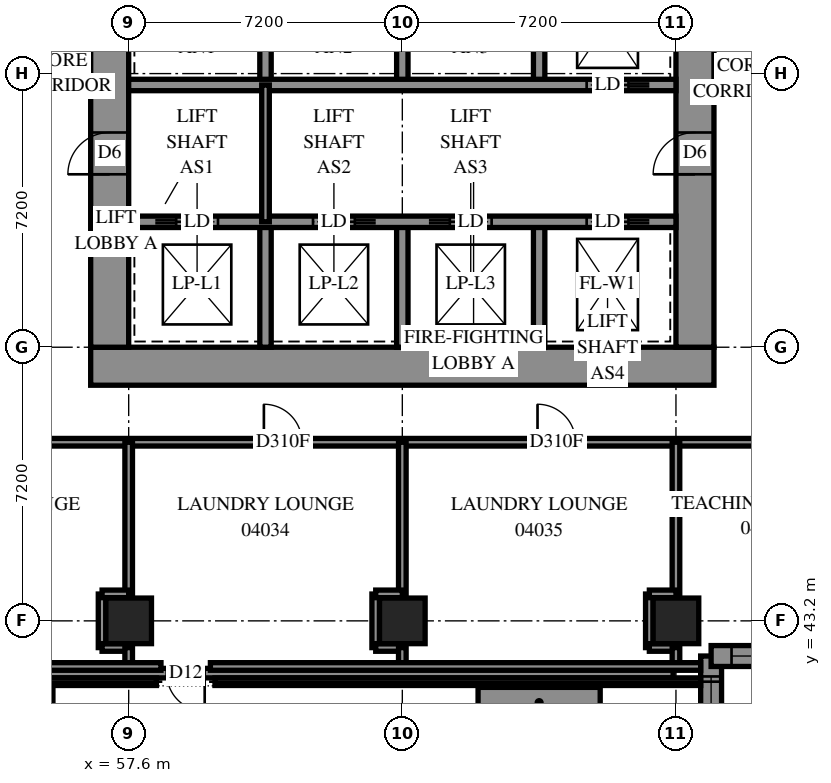
"""IFC4 building model, lengths in metres.
Left out: names, types, materials, properties, quantities, classifications, styles, units other than length and angle.
Written with IfcOpenShell. Run it as: python <this file> out.ifc"""

import sys

from ifc_helpers import new_model, si_unit, direction, frame, frame_2d, origin, origin_2d, place, context, subcontext, project, spatial, polyline, rectangle, outline, extrude, element, fill, save


model = new_model("IFC4")
c1 = context("Model", 3, precision=1e-05, world=origin(), true_north=direction((0.0, 1.0)))
c2 = subcontext(c1, "Body", "Model", "MODEL_VIEW")
j1 = project(units=[si_unit("LENGTHUNIT", "METRE"), si_unit("PLANEANGLEUNIT", "RADIAN")], contexts=[c1])
p1 = place(None, origin())
s1 = spatial("IfcSite", under=j1, at=p1, CompositionType="ELEMENT")
p2 = place(p1, origin())
s2 = spatial("IfcBuilding", under=s1, at=p2, CompositionType="ELEMENT")
p3 = place(p2, frame((0.0, 0.0, 18.6)))
s3 = spatial("IfcBuildingStorey", under=s2, at=p3, CompositionType="ELEMENT", Elevation=18.6)
for number, where, z_axis, x_axis in (
    (1, (57.6, 43.2, 0.0), (0.0, 0.0, 1.0), (1.0, 0.0, 0.0)),
    (2, (64.8, 43.2, 0.0), (0.0, 0.0, 1.0), (1.0, 0.0, 0.0)),
    (3, (72.0, 43.2, 0.0), (0.0, 0.0, 1.0), (1.0, 0.0, 0.0)),
):
    element("IfcColumn", number, at=place(p3, frame(where, z_axis=z_axis, x_axis=x_axis)), inside=s3, PredefinedType="COLUMN", context=c2, shape_type="SweptSolid", body=[
        extrude(rectangle(XDim=1.2, YDim=1.2, at=origin_2d()), origin(), (0.0, 0.0, 1.0), 3.8),
    ])
p4 = place(p3, frame((56.6, 49.9, -0.4), z_axis=(0.0, 0.0, 1.0), x_axis=(1.0, 0.0, 0.0)))
e4 = element("IfcWall", 4, at=p4, inside=s3, PredefinedType="SHEAR", context=c2, shape_type="SweptSolid", body=[
    extrude(rectangle(XDim=16.4, YDim=1.0, at=frame_2d((8.2, 0.0))), origin(), (0.0, 0.0, 1.0), 3.5),
])
p5 = place(p3, frame((57.1, 50.4, -0.4), z_axis=(0.0, 0.0, 1.0), x_axis=(0.0, 1.0, 0.0)))
e5 = element("IfcWall", 5, at=p5, inside=s3, PredefinedType="SHEAR", context=c2, shape_type="SweptSolid", body=[
    extrude(rectangle(XDim=14.4, YDim=1.0, at=frame_2d((7.2, 0.0))), origin(), (0.0, 0.0, 1.0), 3.5),
])
p6 = place(p5, frame((4.55, 0.0, 0.4)))
e6 = element("IfcOpeningElement", 6, at=p6, cuts=e5, PredefinedType="OPENING", context=c2, shape_type="SweptSolid", body=[
    extrude(rectangle(XDim=1.1, YDim=2.1, at=frame_2d((0.55, 1.05))), frame((0.0, 0.51, 0.0), z_axis=(0.0, -1.0, 0.0), x_axis=(1.0, 0.0, 0.0)), (0.0, 0.0, 1.0), 1.02),
])
p7 = place(p5, frame((11.35, 0.0, 0.4)))
e7 = element("IfcOpeningElement", 7, at=p7, cuts=e5, PredefinedType="OPENING", context=c2, shape_type="SweptSolid", body=[
    extrude(rectangle(XDim=1.1, YDim=2.1, at=frame_2d((0.55, 1.05))), frame((0.0, 0.51, 0.0), z_axis=(0.0, -1.0, 0.0), x_axis=(1.0, 0.0, 0.0)), (0.0, 0.0, 1.0), 1.02),
])
p8 = place(p3, frame((72.5, 50.4, -0.4), z_axis=(0.0, 0.0, 1.0), x_axis=(0.0, 1.0, 0.0)))
e8 = element("IfcWall", 8, at=p8, inside=s3, PredefinedType="SHEAR", context=c2, shape_type="SweptSolid", body=[
    extrude(rectangle(XDim=14.4, YDim=1.0, at=frame_2d((7.2, 0.0))), origin(), (0.0, 0.0, 1.0), 3.5),
])
p9 = place(p8, frame((4.55, 0.0, 0.4)))
e9 = element("IfcOpeningElement", 9, at=p9, cuts=e8, PredefinedType="OPENING", context=c2, shape_type="SweptSolid", body=[
    extrude(rectangle(XDim=1.1, YDim=2.1, at=frame_2d((0.55, 1.05))), frame((0.0, 0.51, 0.0), z_axis=(0.0, -1.0, 0.0), x_axis=(1.0, 0.0, 0.0)), (0.0, 0.0, 1.0), 1.02),
])
p10 = place(p8, frame((11.35, 0.0, 0.4)))
e10 = element("IfcOpeningElement", 10, at=p10, cuts=e8, PredefinedType="OPENING", context=c2, shape_type="SweptSolid", body=[
    extrude(rectangle(XDim=1.1, YDim=2.1, at=frame_2d((0.55, 1.05))), frame((0.0, 0.51, 0.0), z_axis=(0.0, -1.0, 0.0), x_axis=(1.0, 0.0, 0.0)), (0.0, 0.0, 1.0), 1.02),
])
for number, where, z_axis, x_axis in (
    (11, (61.2, 50.4, 0.0), (0.0, 0.0, 1.0), (0.0, 1.0, 0.0)),
    (12, (61.2, 57.3, 0.0), (0.0, 0.0, 1.0), (0.0, 1.0, 0.0)),
    (13, (64.8, 50.4, 0.0), (0.0, 0.0, 1.0), (0.0, 1.0, 0.0)),
    (14, (64.8, 57.3, 0.0), (0.0, 0.0, 1.0), (0.0, 1.0, 0.0)),
    (15, (68.4, 50.4, 0.0), (0.0, 0.0, 1.0), (0.0, 1.0, 0.0)),
    (16, (68.4, 57.3, 0.0), (0.0, 0.0, 1.0), (0.0, 1.0, 0.0)),
):
    element("IfcWall", number, at=place(p3, frame(where, z_axis=z_axis, x_axis=x_axis)), inside=s3, PredefinedType="SOLIDWALL", context=c2, shape_type="SweptSolid", body=[
        extrude(rectangle(XDim=3.3, YDim=0.3, at=frame_2d((1.65, 0.0))), origin(), (0.0, 0.0, 1.0), 3.8),
    ])
p11 = place(p3, frame((57.6, 53.7, 0.0), z_axis=(0.0, 0.0, 1.0), x_axis=(1.0, 0.0, 0.0)))
e17 = element("IfcWall", 17, at=p11, inside=s3, PredefinedType="SOLIDWALL", context=c2, shape_type="SweptSolid", body=[
    extrude(rectangle(XDim=14.4, YDim=0.3, at=frame_2d((7.2, 0.0))), origin(), (0.0, 0.0, 1.0), 3.8),
])
p12 = place(p11, frame((1.25, 0.0, 0.0)))
e18 = element("IfcOpeningElement", 18, at=p12, cuts=e17, PredefinedType="OPENING", context=c2, shape_type="SweptSolid", body=[
    extrude(rectangle(XDim=1.1, YDim=2.1, at=frame_2d((0.55, 1.05))), frame((0.0, 0.16, 0.0), z_axis=(0.0, -1.0, 0.0), x_axis=(1.0, 0.0, 0.0)), (0.0, 0.0, 1.0), 0.32),
])
p13 = place(p11, frame((4.85, 0.0, 0.0)))
e19 = element("IfcOpeningElement", 19, at=p13, cuts=e17, PredefinedType="OPENING", context=c2, shape_type="SweptSolid", body=[
    extrude(rectangle(XDim=1.1, YDim=2.1, at=frame_2d((0.55, 1.05))), frame((0.0, 0.16, 0.0), z_axis=(0.0, -1.0, 0.0), x_axis=(1.0, 0.0, 0.0)), (0.0, 0.0, 1.0), 0.32),
])
p14 = place(p11, frame((8.45, 0.0, 0.0)))
e20 = element("IfcOpeningElement", 20, at=p14, cuts=e17, PredefinedType="OPENING", context=c2, shape_type="SweptSolid", body=[
    extrude(rectangle(XDim=1.1, YDim=2.1, at=frame_2d((0.55, 1.05))), frame((0.0, 0.16, 0.0), z_axis=(0.0, -1.0, 0.0), x_axis=(1.0, 0.0, 0.0)), (0.0, 0.0, 1.0), 0.32),
])
p15 = place(p11, frame((12.05, 0.0, 0.0)))
e21 = element("IfcOpeningElement", 21, at=p15, cuts=e17, PredefinedType="OPENING", context=c2, shape_type="SweptSolid", body=[
    extrude(rectangle(XDim=1.1, YDim=2.1, at=frame_2d((0.55, 1.05))), frame((0.0, 0.16, 0.0), z_axis=(0.0, -1.0, 0.0), x_axis=(1.0, 0.0, 0.0)), (0.0, 0.0, 1.0), 0.32),
])
p16 = place(p3, frame((57.6, 57.3, 0.0), z_axis=(0.0, 0.0, 1.0), x_axis=(1.0, 0.0, 0.0)))
e22 = element("IfcWall", 22, at=p16, inside=s3, PredefinedType="SOLIDWALL", context=c2, shape_type="SweptSolid", body=[
    extrude(rectangle(XDim=14.4, YDim=0.3, at=frame_2d((7.2, 0.0))), origin(), (0.0, 0.0, 1.0), 3.8),
])
p17 = place(p16, frame((12.05, 0.0, 0.0)))
e23 = element("IfcOpeningElement", 23, at=p17, cuts=e22, PredefinedType="OPENING", context=c2, shape_type="SweptSolid", body=[
    extrude(rectangle(XDim=1.1, YDim=2.1, at=frame_2d((0.55, 1.05))), frame((0.0, 0.16, 0.0), z_axis=(0.0, -1.0, 0.0), x_axis=(1.0, 0.0, 0.0)), (0.0, 0.0, 1.0), 0.32),
])
p18 = place(p3, frame((72.925, 35.075, 0.0), z_axis=(0.0, 0.0, 1.0), x_axis=(0.0, 1.0, 0.0)))
e24 = element("IfcWall", 24, at=p18, inside=s3, PredefinedType="SOLIDWALL", context=c2, shape_type="SweptSolid", body=[
    extrude(outline(polyline([(-0.275, -0.275), (6.925, -0.275), (7.475, 0.275), (0.275, 0.275), (-0.275, -0.275)])), origin(), (0.0, 0.0, 1.0), 3.8),
])
p19 = place(p18, frame((1.825, 0.0, 0.7)))
e25 = element("IfcOpeningElement", 25, at=p19, cuts=e24, PredefinedType="OPENING", context=c2, shape_type="SweptSolid", body=[
    extrude(rectangle(XDim=1.8, YDim=2.4, at=frame_2d((0.9, 1.2))), frame((0.0, 0.285, 0.0), z_axis=(0.0, -1.0, 0.0), x_axis=(1.0, 0.0, 0.0)), (0.0, 0.0, 1.0), 0.57),
])
p20 = place(p18, frame((4.862, 0.0, 0.7)))
e26 = element("IfcOpeningElement", 26, at=p20, cuts=e24, PredefinedType="OPENING", context=c2, shape_type="SweptSolid", body=[
    extrude(rectangle(XDim=1.8, YDim=2.4, at=frame_2d((0.9, 1.2))), frame((0.0, 0.285, 0.0), z_axis=(0.0, -1.0, 0.0), x_axis=(1.0, 0.0, 0.0)), (0.0, 0.0, 1.0), 0.57),
])
p21 = place(p3, frame((72.925, 42.275, 0.0), z_axis=(0.0, 0.0, 1.0), x_axis=(1.0, 0.0, 0.0)))
e27 = element("IfcWall", 27, at=p21, inside=s3, PredefinedType="SOLIDWALL", context=c2, shape_type="SweptSolid", body=[
    extrude(outline(polyline([(0.275, -0.275), (4.031, -0.275), (4.259, 0.275), (-0.275, 0.275), (0.275, -0.275)])), origin(), (0.0, 0.0, 1.0), 3.8),
])
p22 = place(p21, frame((0.537, 0.0, 0.7)))
e28 = element("IfcOpeningElement", 28, at=p22, cuts=e27, PredefinedType="OPENING", context=c2, shape_type="SweptSolid", body=[
    extrude(rectangle(XDim=1.8, YDim=2.4, at=frame_2d((0.9, 1.2))), frame((0.0, 0.285, 0.0), z_axis=(0.0, -1.0, 0.0), x_axis=(1.0, 0.0, 0.0)), (0.0, 0.0, 1.0), 0.57),
])
p23 = place(p3, frame((61.2, 53.7, 0.0), z_axis=(0.0, 0.0, 1.0), x_axis=(0.0, 1.0, 0.0)))
e29 = element("IfcWall", 29, at=p23, inside=s3, PredefinedType="PARTITIONING", context=c2, shape_type="SweptSolid", body=[
    extrude(rectangle(XDim=3.6, YDim=0.2, at=frame_2d((1.8, 0.0))), origin(), (0.0, 0.0, 1.0), 3.8),
])
p24 = place(p3, frame((55.1, 47.9, 0.0), z_axis=(0.0, 0.0, 1.0), x_axis=(1.0, 0.0, 0.0)))
e30 = element("IfcWall", 30, at=p24, inside=s3, PredefinedType="PARTITIONING", context=c2, shape_type="SweptSolid", body=[
    extrude(rectangle(XDim=19.208, YDim=0.2, at=frame_2d((9.604, 0.0))), origin(), (0.0, 0.0, 1.0), 3.8),
])
p25 = place(p24, frame((6.058, 0.0, 0.0)))
e31 = element("IfcOpeningElement", 31, at=p25, cuts=e30, PredefinedType="OPENING", context=c2, shape_type="SweptSolid", body=[
    extrude(rectangle(XDim=1.0, YDim=2.1, at=frame_2d((0.5, 1.05))), frame((0.0, 0.11, 0.0), z_axis=(0.0, -1.0, 0.0), x_axis=(1.0, 0.0, 0.0)), (0.0, 0.0, 1.0), 0.22),
])
p26 = place(p24, frame((13.258, 0.0, 0.0)))
e32 = element("IfcOpeningElement", 32, at=p26, cuts=e30, PredefinedType="OPENING", context=c2, shape_type="SweptSolid", body=[
    extrude(rectangle(XDim=1.0, YDim=2.1, at=frame_2d((0.5, 1.05))), frame((0.0, 0.11, 0.0), z_axis=(0.0, -1.0, 0.0), x_axis=(1.0, 0.0, 0.0)), (0.0, 0.0, 1.0), 0.22),
])
for number, where, z_axis, x_axis in (
    (33, (57.6, 43.906, 0.0), (0.0, 0.0, 1.0), (0.0, 1.0, 0.0)),
    (34, (64.8, 43.906, 0.0), (0.0, 0.0, 1.0), (0.0, 1.0, 0.0)),
    (35, (72.0, 43.906, 0.0), (0.0, 0.0, 1.0), (0.0, 1.0, 0.0)),
):
    element("IfcWall", number, at=place(p3, frame(where, z_axis=z_axis, x_axis=x_axis)), inside=s3, PredefinedType="PARTITIONING", context=c2, shape_type="SweptSolid", body=[
        extrude(rectangle(XDim=3.994, YDim=0.2, at=frame_2d((1.997, 0.0))), origin(), (0.0, 0.0, 1.0), 3.8),
    ])
for number, where, z_axis, x_axis in (
    (36, (56.9, 42.496, 0.0), (0.0, 0.0, 1.0), (0.0, 1.0, 0.0)),
    (37, (64.1, 42.496, 0.0), (0.0, 0.0, 1.0), (0.0, 1.0, 0.0)),
    (38, (71.3, 42.496, 0.0), (0.0, 0.0, 1.0), (0.0, 1.0, 0.0)),
):
    element("IfcWall", number, at=place(p3, frame(where, z_axis=z_axis, x_axis=x_axis)), inside=s3, PredefinedType="PARTITIONING", context=c2, shape_type="SweptSolid", body=[
        extrude(rectangle(XDim=1.41, YDim=0.2, at=frame_2d((0.705, 0.0))), origin(), (0.0, 0.0, 1.0), 3.8),
    ])
for number, where, z_axis, x_axis in (
    (39, (56.9, 43.91, 0.0), (0.0, 0.0, 1.0), (1.0, 0.0, 0.0)),
    (40, (64.1, 43.91, 0.0), (0.0, 0.0, 1.0), (1.0, 0.0, 0.0)),
    (41, (71.3, 43.91, 0.0), (0.0, 0.0, 1.0), (1.0, 0.0, 0.0)),
    (42, (56.9, 42.5, 0.0), (0.0, 0.0, 1.0), (1.0, 0.0, 0.0)),
    (43, (64.1, 42.5, 0.0), (0.0, 0.0, 1.0), (1.0, 0.0, 0.0)),
    (44, (71.3, 42.5, 0.0), (0.0, 0.0, 1.0), (1.0, 0.0, 0.0)),
):
    element("IfcWall", number, at=place(p3, frame(where, z_axis=z_axis, x_axis=x_axis)), inside=s3, PredefinedType="PARTITIONING", context=c2, shape_type="SweptSolid", body=[
        extrude(rectangle(XDim=0.7, YDim=0.2, at=frame_2d((0.35, 0.0))), origin(), (0.0, 0.0, 1.0), 3.8),
    ])
for number, where, z_axis, x_axis in (
    (45, (57.6, 42.0, 0.0), (0.0, 0.0, 1.0), (0.0, 1.0, 0.0)),
    (46, (64.8, 42.0, 0.0), (0.0, 0.0, 1.0), (0.0, 1.0, 0.0)),
    (47, (72.0, 42.0, 0.0), (0.0, 0.0, 1.0), (0.0, 1.0, 0.0)),
):
    element("IfcWall", number, at=place(p3, frame(where, z_axis=z_axis, x_axis=x_axis)), inside=s3, PredefinedType="PARTITIONING", context=c2, shape_type="SweptSolid", body=[
        extrude(rectangle(XDim=0.496, YDim=0.2, at=frame_2d((0.248, 0.0))), origin(), (0.0, 0.0, 1.0), 3.8),
    ])
p27 = place(p3, frame((71.925, 41.825, 0.0), z_axis=(0.0, 0.0, 1.0), x_axis=(-1.0, 0.0, 0.0)))
e48 = element("IfcWall", 48, at=p27, inside=s3, PredefinedType="SOLIDWALL", context=c2, shape_type="SweptSolid", body=[
    extrude(rectangle(XDim=57.45, YDim=0.25, at=frame_2d((28.725, 0.0))), origin(), (0.0, 0.0, 1.0), 3.8),
])
p28 = place(p27, frame((12.325, 0.0, 0.0)))
e49 = element("IfcOpeningElement", 49, at=p28, cuts=e48, PredefinedType="OPENING", context=c2, shape_type="SweptSolid", body=[
    extrude(rectangle(XDim=1.0, YDim=2.1, at=frame_2d((0.5, 1.05))), frame((0.0, 0.135, 0.0), z_axis=(0.0, -1.0, 0.0), x_axis=(1.0, 0.0, 0.0)), (0.0, 0.0, 1.0), 0.27),
])
p29 = place(p27, frame((44.125, 0.0, 0.0)))
e50 = element("IfcOpeningElement", 50, at=p29, cuts=e48, PredefinedType="OPENING", context=c2, shape_type="SweptSolid", body=[
    extrude(rectangle(XDim=1.0, YDim=2.1, at=frame_2d((0.5, 1.05))), frame((0.0, 0.135, 0.0), z_axis=(0.0, -1.0, 0.0), x_axis=(1.0, 0.0, 0.0)), (0.0, 0.0, 1.0), 0.27),
])
p30 = place(p3, frame((59.75, 42.0, 0.0), z_axis=(0.0, 0.0, 1.0), x_axis=(1.0, 0.0, 0.0)))
e51 = element("IfcWall", 51, at=p30, inside=s3, PredefinedType="PARTITIONING", context=c2, shape_type="SweptSolid", body=[
    extrude(outline(polyline([(0.0, -0.1), (12.9, -0.1), (12.9, 0.1), (0.0, 0.1), (0.0, -0.1)])), origin(), (0.0, 0.0, 1.0), 3.8),
])
p31 = place(p3, frame((27.95, 42.0, 0.0), z_axis=(0.0, 0.0, 1.0), x_axis=(1.0, 0.0, 0.0)))
e52 = element("IfcWall", 52, at=p31, inside=s3, PredefinedType="PARTITIONING", context=c2, shape_type="SweptSolid", body=[
    extrude(outline(polyline([(0.0, -0.1), (30.5, -0.1), (30.5, 0.1), (0.0, 0.1), (0.0, -0.1)])), origin(), (0.0, 0.0, 1.0), 3.8),
])
p32 = place(p3, frame((72.65, 41.6, 0.0), z_axis=(0.0, 0.0, 1.0), x_axis=(-1.0, 0.0, 0.0)))
e53 = element("IfcWall", 53, at=p32, inside=s3, PredefinedType="PARAPET", context=c2, shape_type="SweptSolid", body=[
    extrude(outline(polyline([(0.0, -0.1), (12.78, -0.1), (12.78, 0.1), (0.0, 0.1), (0.0, -0.1)])), origin(), (0.0, 0.0, 1.0), 0.25),
])
p33 = place(p3, frame((58.33, 41.6, 0.0), z_axis=(0.0, 0.0, 1.0), x_axis=(-1.0, 0.0, 0.0)))
e54 = element("IfcWall", 54, at=p33, inside=s3, PredefinedType="PARAPET", context=c2, shape_type="SweptSolid", body=[
    extrude(outline(polyline([(0.0, -0.1), (30.26, -0.1), (30.26, 0.1), (0.0, 0.1), (0.0, -0.1)])), origin(), (0.0, 0.0, 1.0), 0.25),
])
for number, where, z_axis, x_axis in (
    (55, (70.007, 41.05, 0.0), (0.0, 0.0, 1.0), (-1.0, 0.0, 0.0)),
    (56, (55.607, 41.05, 0.0), (0.0, 0.0, 1.0), (-1.0, 0.0, 0.0)),
):
    element("IfcWall", number, at=place(p3, frame(where, z_axis=z_axis, x_axis=x_axis)), inside=s3, PredefinedType="SOLIDWALL", context=c2, shape_type="SweptSolid", body=[
        extrude(outline(polyline([(0.0, -0.4), (3.214, -0.4), (3.214, 0.4), (0.0, 0.4), (0.0, -0.4)])), origin(), (0.0, 0.0, 1.0), 0.65),
    ])
p34 = place(p20, origin())
e57 = element("IfcWindow", 57, at=p34, inside=s3, PartitioningType="SINGLE_PANEL", PredefinedType="WINDOW", context=c2, shape_type="SweptSolid", body=[
    extrude(rectangle(XDim=1.8, YDim=2.4, at=frame_2d((0.9, 1.2))), frame((0.0, 0.155, 0.0), z_axis=(0.0, -1.0, 0.0), x_axis=(1.0, 0.0, 0.0)), (0.0, 0.0, 1.0), 0.06),
])
fill(e26, e57)
p35 = place(p22, origin())
e58 = element("IfcWindow", 58, at=p35, inside=s3, PartitioningType="SINGLE_PANEL", PredefinedType="WINDOW", context=c2, shape_type="SweptSolid", body=[
    extrude(rectangle(XDim=1.8, YDim=2.4, at=frame_2d((0.9, 1.2))), frame((0.0, 0.155, 0.0), z_axis=(0.0, -1.0, 0.0), x_axis=(1.0, 0.0, 0.0)), (0.0, 0.0, 1.0), 0.06),
])
fill(e28, e58)
p36 = place(p6, origin())
e59 = element("IfcDoor", 59, at=p36, inside=s3, OperationType="DOUBLE_DOOR_SINGLE_SWING", PredefinedType="DOOR", context=c2, shape_type="SweptSolid", body=[
    extrude(rectangle(XDim=1.1, YDim=2.1, at=frame_2d((0.55, 1.05))), frame((0.0, 0.025, 0.0), z_axis=(0.0, -1.0, 0.0), x_axis=(1.0, 0.0, 0.0)), (0.0, 0.0, 1.0), 0.05),
])
fill(e6, e59)
p37 = place(p9, origin())
e60 = element("IfcDoor", 60, at=p37, inside=s3, OperationType="DOUBLE_DOOR_SINGLE_SWING", PredefinedType="DOOR", context=c2, shape_type="SweptSolid", body=[
    extrude(rectangle(XDim=1.1, YDim=2.1, at=frame_2d((0.55, 1.05))), frame((0.0, 0.025, 0.0), z_axis=(0.0, -1.0, 0.0), x_axis=(1.0, 0.0, 0.0)), (0.0, 0.0, 1.0), 0.05),
])
fill(e9, e60)
p38 = place(p12, origin())
e61 = element("IfcDoor", 61, at=p38, inside=s3, OperationType="SLIDING_TO_LEFT", PredefinedType="DOOR", context=c2, shape_type="SweptSolid", body=[
    extrude(rectangle(XDim=1.1, YDim=2.1, at=frame_2d((0.55, 1.05))), frame((0.0, 0.025, 0.0), z_axis=(0.0, -1.0, 0.0), x_axis=(1.0, 0.0, 0.0)), (0.0, 0.0, 1.0), 0.05),
])
fill(e18, e61)
p39 = place(p13, origin())
e62 = element("IfcDoor", 62, at=p39, inside=s3, OperationType="SLIDING_TO_RIGHT", PredefinedType="DOOR", context=c2, shape_type="SweptSolid", body=[
    extrude(rectangle(XDim=1.1, YDim=2.1, at=frame_2d((0.55, 1.05))), frame((0.0, 0.025, 0.0), z_axis=(0.0, -1.0, 0.0), x_axis=(1.0, 0.0, 0.0)), (0.0, 0.0, 1.0), 0.05),
])
fill(e19, e62)
p40 = place(p14, origin())
e63 = element("IfcDoor", 63, at=p40, inside=s3, OperationType="SLIDING_TO_LEFT", PredefinedType="DOOR", context=c2, shape_type="SweptSolid", body=[
    extrude(rectangle(XDim=1.1, YDim=2.1, at=frame_2d((0.55, 1.05))), frame((0.0, 0.025, 0.0), z_axis=(0.0, -1.0, 0.0), x_axis=(1.0, 0.0, 0.0)), (0.0, 0.0, 1.0), 0.05),
])
fill(e20, e63)
p41 = place(p15, origin())
e64 = element("IfcDoor", 64, at=p41, inside=s3, OperationType="SLIDING_TO_RIGHT", PredefinedType="DOOR", context=c2, shape_type="SweptSolid", body=[
    extrude(rectangle(XDim=1.1, YDim=2.1, at=frame_2d((0.55, 1.05))), frame((0.0, 0.025, 0.0), z_axis=(0.0, -1.0, 0.0), x_axis=(1.0, 0.0, 0.0)), (0.0, 0.0, 1.0), 0.05),
])
fill(e21, e64)
p42 = place(p17, origin())
e65 = element("IfcDoor", 65, at=p42, inside=s3, OperationType="SLIDING_TO_RIGHT", PredefinedType="DOOR", context=c2, shape_type="SweptSolid", body=[
    extrude(rectangle(XDim=1.1, YDim=2.1, at=frame_2d((0.55, 1.05))), frame((0.0, 0.025, 0.0), z_axis=(0.0, -1.0, 0.0), x_axis=(1.0, 0.0, 0.0)), (0.0, 0.0, 1.0), 0.05),
])
fill(e23, e65)
p43 = place(p25, origin())
e66 = element("IfcDoor", 66, at=p43, inside=s3, OperationType="SINGLE_SWING_LEFT", PredefinedType="DOOR", context=c2, shape_type="SweptSolid", body=[
    extrude(rectangle(XDim=1.0, YDim=2.1, at=frame_2d((0.5, 1.05))), frame((0.0, 0.025, 0.0), z_axis=(0.0, -1.0, 0.0), x_axis=(1.0, 0.0, 0.0)), (0.0, 0.0, 1.0), 0.05),
])
fill(e31, e66)
p44 = place(p26, origin())
e67 = element("IfcDoor", 67, at=p44, inside=s3, OperationType="SINGLE_SWING_LEFT", PredefinedType="DOOR", context=c2, shape_type="SweptSolid", body=[
    extrude(rectangle(XDim=1.0, YDim=2.1, at=frame_2d((0.5, 1.05))), frame((0.0, 0.025, 0.0), z_axis=(0.0, -1.0, 0.0), x_axis=(1.0, 0.0, 0.0)), (0.0, 0.0, 1.0), 0.05),
])
fill(e32, e67)
p45 = place(p28, origin())
e68 = element("IfcDoor", 68, at=p45, inside=s3, OperationType="SINGLE_SWING_LEFT", PredefinedType="DOOR", context=c2, shape_type="SweptSolid", body=[
    extrude(rectangle(XDim=1.0, YDim=2.1, at=frame_2d((0.5, 1.05))), frame((0.0, 0.025, 0.0), z_axis=(0.0, -1.0, 0.0), x_axis=(1.0, 0.0, 0.0)), (0.0, 0.0, 1.0), 0.05),
])
fill(e49, e68)
save(model, sys.argv[1])
